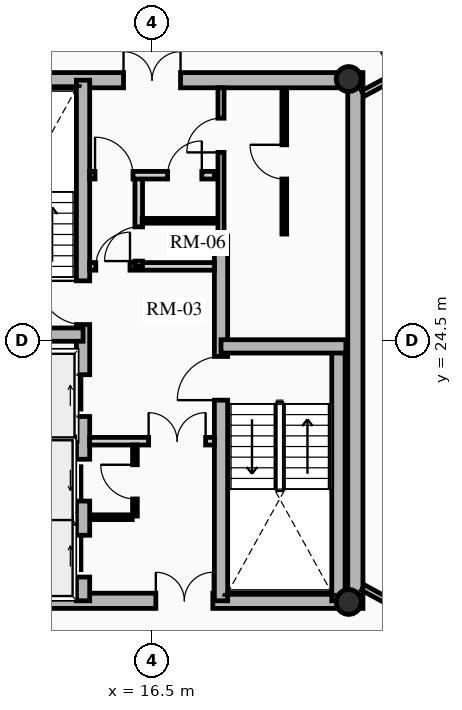
"""IFC4 building model, lengths in metres.
Left out: names, types, materials, properties, quantities, classifications, styles, units other than length and angle.
Written with IfcOpenShell. Run it as: python <this file> out.ifc"""

import sys

from ifc_helpers import new_model, si_unit, direction, frame, frame_2d, origin, origin_2d, place, context, subcontext, project, spatial, rectangle, hollow_circle, extrude, source, transform, mapped, element, fill, save


model = new_model("IFC4")
c1 = context("Model", 3, precision=1e-05, world=origin(), true_north=direction((0.0, 1.0)))
c2 = subcontext(c1, "Body", "Model", "MODEL_VIEW")
j1 = project(units=[si_unit("LENGTHUNIT", "METRE"), si_unit("PLANEANGLEUNIT", "RADIAN")], contexts=[c1])
p1 = place(None, origin())
s1 = spatial("IfcSite", under=j1, at=p1, CompositionType="ELEMENT")
p2 = place(p1, origin())
s2 = spatial("IfcBuilding", under=s1, at=p2, CompositionType="ELEMENT")
p3 = place(p2, frame((0.0, 0.0, 229.25)))
s3 = spatial("IfcBuildingStorey", under=s2, at=p3, CompositionType="ELEMENT", Elevation=229.25)
p4 = place(p3, frame((21.85, 17.45, 0.0), z_axis=(0.0, 0.0, 1.0), x_axis=(0.0, 1.0, 0.0)))
e1 = element("IfcWall", 1, at=p4, inside=s3, PredefinedType="SHEAR", context=c2, shape_type="SweptSolid", body=[
    extrude(rectangle(XDim=14.1, YDim=0.4, at=frame_2d((7.05, 0.0))), origin(), (0.0, 0.0, 1.0), 3.2),
])
p5 = place(p3, frame((11.15, 17.65, 0.0), z_axis=(0.0, 0.0, 1.0), x_axis=(1.0, 0.0, 0.0)))
e2 = element("IfcWall", 2, at=p5, inside=s3, PredefinedType="SHEAR", context=c2, shape_type="SweptSolid", body=[
    extrude(rectangle(XDim=10.7, YDim=0.4, at=frame_2d((5.35, 0.0))), origin(), (0.0, 0.0, 1.0), 3.2),
])
m1 = source(origin(), c2, "Body", "SweptSolid", [
    extrude(rectangle(XDim=1.5, YDim=2.02, at=frame_2d((0.75, 1.01))), frame((0.0, 0.21, 0.0), z_axis=(0.0, -1.0, 0.0), x_axis=(1.0, 0.0, 0.0)), (0.0, 0.0, 1.0), 0.42),
])
p6 = place(p5, frame((5.45, 0.0, 0.0)))
e3 = element("IfcOpeningElement", 3, at=p6, cuts=e2, PredefinedType="OPENING", context=c2, shape_type="MappedRepresentation", body=[
    mapped(m1, transform((0.0, 0.0, 0.0), x_axis=(1.0, 0.0, 0.0), y_axis=(0.0, 1.0, 0.0), z_axis=(0.0, 0.0, 1.0), scale=1.0)),
])
p7 = place(p3, frame((11.15, 31.35, 0.0), z_axis=(0.0, 0.0, 1.0), x_axis=(1.0, 0.0, 0.0)))
e4 = element("IfcWall", 4, at=p7, inside=s3, PredefinedType="SHEAR", context=c2, shape_type="SweptSolid", body=[
    extrude(rectangle(XDim=10.7, YDim=0.4, at=frame_2d((5.35, 0.0))), origin(), (0.0, 0.0, 1.0), 3.2),
])
p8 = place(p7, frame((4.6, 0.0, 0.0)))
e5 = element("IfcOpeningElement", 5, at=p8, cuts=e4, PredefinedType="OPENING", context=c2, shape_type="MappedRepresentation", body=[
    mapped(m1, transform((0.0, 0.0, 0.0), x_axis=(1.0, 0.0, 0.0), y_axis=(0.0, 1.0, 0.0), z_axis=(0.0, 0.0, 1.0), scale=1.0)),
])
p9 = place(p3, frame((14.685, 17.65, 0.0), z_axis=(0.0, 0.0, 1.0), x_axis=(0.0, 1.0, 0.0)))
e6 = element("IfcWall", 6, at=p9, inside=s3, PredefinedType="SHEAR", context=c2, shape_type="SweptSolid", body=[
    extrude(rectangle(XDim=13.7, YDim=0.35, at=frame_2d((6.85, 0.0))), origin(), (0.0, 0.0, 1.0), 3.2),
])
m2 = source(origin(), c2, "Body", "SweptSolid", [
    extrude(rectangle(XDim=1.1, YDim=2.015, at=frame_2d((0.55, 1.007))), frame((0.0, 0.185, 0.0), z_axis=(0.0, -1.0, 0.0), x_axis=(1.0, 0.0, 0.0)), (0.0, 0.0, 1.0), 0.37),
])
p10 = place(p9, frame((4.85, 0.0, 0.0)))
e7 = element("IfcOpeningElement", 7, at=p10, cuts=e6, PredefinedType="OPENING", context=c2, shape_type="MappedRepresentation", body=[
    mapped(m2, transform((0.0, 0.0, 0.0), x_axis=(1.0, 0.0, 0.0), y_axis=(0.0, 1.0, 0.0), z_axis=(0.0, 0.0, 1.0), scale=1.0)),
])
p11 = place(p9, frame((0.625, 0.0, 0.0)))
e8 = element("IfcOpeningElement", 8, at=p11, cuts=e6, PredefinedType="OPENING", context=c2, shape_type="MappedRepresentation", body=[
    mapped(m2, transform((0.0, 0.0, 0.0), x_axis=(1.0, 0.0, 0.0), y_axis=(0.0, 1.0, 0.0), z_axis=(0.0, 0.0, 1.0), scale=1.0)),
])
p12 = place(p9, frame((2.625, 0.0, 0.0)))
e9 = element("IfcOpeningElement", 9, at=p12, cuts=e6, PredefinedType="OPENING", context=c2, shape_type="MappedRepresentation", body=[
    mapped(m2, transform((0.0, 0.0, 0.0), x_axis=(1.0, 0.0, 0.0), y_axis=(0.0, 1.0, 0.0), z_axis=(0.0, 0.0, 1.0), scale=1.0)),
])
m3 = source(origin(), c2, "Body", "SweptSolid", [
    extrude(rectangle(XDim=1.15, YDim=2.02, at=frame_2d((0.575, 1.01))), frame((0.0, 0.185, 0.0), z_axis=(0.0, -1.0, 0.0), x_axis=(1.0, 0.0, 0.0)), (0.0, 0.0, 1.0), 0.37),
])
p13 = place(p9, frame((7.27, 0.0, 0.0)))
e10 = element("IfcOpeningElement", 10, at=p13, cuts=e6, PredefinedType="OPENING", context=c2, shape_type="MappedRepresentation", body=[
    mapped(m3, transform((0.0, 0.0, 0.0), x_axis=(1.0, 0.0, 0.0), y_axis=(0.0, 1.0, 0.0), z_axis=(0.0, 0.0, 1.0), scale=1.0)),
])
p14 = place(p3, frame((18.315, 17.65, 0.0), z_axis=(0.0, 0.0, 1.0), x_axis=(0.0, 1.0, 0.0)))
e11 = element("IfcWall", 11, at=p14, inside=s3, PredefinedType="SHEAR", context=c2, shape_type="SweptSolid", body=[
    extrude(rectangle(XDim=9.6, YDim=0.35, at=frame_2d((4.8, 0.0))), origin(), (0.0, 0.0, 1.0), 3.2),
])
p15 = place(p14, frame((5.28, 0.0, 0.0)))
e12 = element("IfcOpeningElement", 12, at=p15, cuts=e11, PredefinedType="OPENING", context=c2, shape_type="MappedRepresentation", body=[
    mapped(m3, transform((0.0, 0.0, 0.0), x_axis=(1.0, 0.0, 0.0), y_axis=(0.0, 1.0, 0.0), z_axis=(0.0, 0.0, 1.0), scale=1.0)),
])
p16 = place(p3, frame((11.4, 24.655, 0.0), z_axis=(0.0, 0.0, 1.0), x_axis=(1.0, 0.0, 0.0)))
e13 = element("IfcWall", 13, at=p16, inside=s3, PredefinedType="SHEAR", context=c2, shape_type="SweptSolid", body=[
    extrude(rectangle(XDim=3.285, YDim=0.35, at=frame_2d((1.643, 0.0))), origin(), (0.0, 0.0, 1.0), 3.2),
])
p17 = place(p3, frame((21.405, 17.65, 0.0), z_axis=(0.0, 0.0, 1.0), x_axis=(0.0, 1.0, 0.0)))
e14 = element("IfcWall", 14, at=p17, inside=s3, PredefinedType="SHEAR", context=c2, shape_type="SweptSolid", body=[
    extrude(rectangle(XDim=6.695, YDim=0.35, at=frame_2d((3.348, 0.0))), origin(), (0.0, 0.0, 1.0), 3.2),
])
p18 = place(p3, frame((18.315, 24.345, 0.0), z_axis=(0.0, 0.0, 1.0), x_axis=(1.0, 0.0, 0.0)))
e15 = element("IfcWall", 15, at=p18, inside=s3, PredefinedType="SHEAR", context=c2, shape_type="SweptSolid", body=[
    extrude(rectangle(XDim=3.285, YDim=0.35, at=frame_2d((1.643, 0.0))), origin(), (0.0, 0.0, 1.0), 3.2),
])
for number, where, z_axis, x_axis in (
    (16, (21.675, 17.62, 0.0), (0.0, 0.0, 1.0), (1.0, 0.0, 0.0)),
    (17, (21.675, 31.38, 0.0), (0.0, 0.0, 1.0), (1.0, 0.0, 0.0)),
):
    element("IfcColumn", number, at=place(p3, frame(where, z_axis=z_axis, x_axis=x_axis)), inside=s3, PredefinedType="COLUMN", context=c2, shape_type="SweptSolid", body=[
        extrude(hollow_circle(Radius=0.33, WallThickness=0.025, at=origin_2d()), origin(), (0.0, 0.0, 1.0), 3.2),
    ])
for number, where, z_axis, x_axis in (
    (18, (11.52, 21.8, 0.0), (0.0, 0.0, 1.0), (1.0, 0.0, 0.0)),
    (19, (11.52, 19.825, 0.0), (0.0, 0.0, 1.0), (1.0, 0.0, 0.0)),
):
    element("IfcWall", number, at=place(p3, frame(where, z_axis=z_axis, x_axis=x_axis)), inside=s3, PredefinedType="SHEAR", context=c2, shape_type="SweptSolid", body=[
        extrude(rectangle(XDim=2.97, YDim=0.2, at=frame_2d((1.485, 0.0))), origin(), (0.0, 0.0, 1.0), 3.2),
    ])
p19 = place(p3, frame((14.86, 21.85, 0.0), z_axis=(0.0, 0.0, 1.0), x_axis=(1.0, 0.0, 0.0)))
e20 = element("IfcWall", 20, at=p19, inside=s3, PredefinedType="PARTITIONING", context=c2, shape_type="SweptSolid", body=[
    extrude(rectangle(XDim=3.28, YDim=0.2, at=frame_2d((1.64, 0.0))), origin(), (0.0, 0.0, 1.0), 2.975),
])
m4 = source(origin(), c2, "Body", "SweptSolid", [
    extrude(rectangle(XDim=1.5, YDim=2.02, at=frame_2d((0.75, 1.01))), frame((0.0, 0.11, 0.0), z_axis=(0.0, -1.0, 0.0), x_axis=(1.0, 0.0, 0.0)), (0.0, 0.0, 1.0), 0.22),
])
p20 = place(p19, frame((1.55, 0.0, 0.0)))
e21 = element("IfcOpeningElement", 21, at=p20, cuts=e20, PredefinedType="OPENING", context=c2, shape_type="MappedRepresentation", body=[
    mapped(m4, transform((0.0, 0.0, 0.0), x_axis=(1.0, 0.0, 0.0), y_axis=(0.0, 1.0, 0.0), z_axis=(0.0, 0.0, 1.0), scale=1.0)),
])
p21 = place(p3, frame((14.86, 26.45, 0.0), z_axis=(0.0, 0.0, 1.0), x_axis=(1.0, 0.0, 0.0)))
e22 = element("IfcWall", 22, at=p21, inside=s3, PredefinedType="PARTITIONING", context=c2, shape_type="SweptSolid", body=[
    extrude(rectangle(XDim=3.28, YDim=0.2, at=frame_2d((1.64, 0.0))), origin(), (0.0, 0.0, 1.0), 2.975),
])
m5 = source(origin(), c2, "Body", "SweptSolid", [
    extrude(rectangle(XDim=0.9, YDim=2.005, at=frame_2d((0.45, 1.002))), frame((0.0, 0.11, 0.0), z_axis=(0.0, -1.0, 0.0), x_axis=(1.0, 0.0, 0.0)), (0.0, 0.0, 1.0), 0.22),
])
p22 = place(p21, frame((0.16, 0.0, 0.0)))
e23 = element("IfcOpeningElement", 23, at=p22, cuts=e22, PredefinedType="OPENING", context=c2, shape_type="MappedRepresentation", body=[
    mapped(m5, transform((0.0, 0.0, 0.0), x_axis=(1.0, 0.0, 0.0), y_axis=(0.0, 1.0, 0.0), z_axis=(0.0, 0.0, 1.0), scale=1.0)),
])
p23 = place(p3, frame((16.15, 26.45, 0.0), z_axis=(0.0, 0.0, 1.0), x_axis=(0.0, 1.0, 0.0)))
e24 = element("IfcWall", 24, at=p23, inside=s3, PredefinedType="PARTITIONING", context=c2, shape_type="SweptSolid", body=[
    extrude(rectangle(XDim=2.4, YDim=0.2, at=frame_2d((1.2, 0.0))), origin(), (0.0, 0.0, 1.0), 2.975),
])
p24 = place(p23, frame((0.14, 0.0, 0.0)))
e25 = element("IfcOpeningElement", 25, at=p24, cuts=e24, PredefinedType="OPENING", context=c2, shape_type="MappedRepresentation", body=[
    mapped(m5, transform((0.0, 0.0, 0.0), x_axis=(1.0, 0.0, 0.0), y_axis=(0.0, 1.0, 0.0), z_axis=(0.0, 0.0, 1.0), scale=1.0)),
])
p25 = place(p3, frame((14.86, 28.85, 0.0), z_axis=(0.0, 0.0, 1.0), x_axis=(1.0, 0.0, 0.0)))
e26 = element("IfcWall", 26, at=p25, inside=s3, PredefinedType="PARTITIONING", context=c2, shape_type="SweptSolid", body=[
    extrude(rectangle(XDim=3.28, YDim=0.2, at=frame_2d((1.64, 0.0))), origin(), (0.0, 0.0, 1.0), 2.975),
])
m6 = source(origin(), c2, "Body", "SweptSolid", [
    extrude(rectangle(XDim=1.0, YDim=2.015, at=frame_2d((0.5, 1.007))), frame((0.0, 0.11, 0.0), z_axis=(0.0, -1.0, 0.0), x_axis=(1.0, 0.0, 0.0)), (0.0, 0.0, 1.0), 0.22),
])
p26 = place(p25, frame((0.14, 0.0, 0.0)))
e27 = element("IfcOpeningElement", 27, at=p26, cuts=e26, PredefinedType="OPENING", context=c2, shape_type="MappedRepresentation", body=[
    mapped(m6, transform((0.0, 0.0, 0.0), x_axis=(1.0, 0.0, 0.0), y_axis=(0.0, 1.0, 0.0), z_axis=(0.0, 0.0, 1.0), scale=1.0)),
])
p27 = place(p25, frame((2.05, 0.0, 0.0)))
e28 = element("IfcOpeningElement", 28, at=p27, cuts=e26, PredefinedType="OPENING", context=c2, shape_type="MappedRepresentation", body=[
    mapped(m5, transform((0.0, 0.0, 0.0), x_axis=(1.0, 0.0, 0.0), y_axis=(0.0, 1.0, 0.0), z_axis=(0.0, 0.0, 1.0), scale=1.0)),
])
p28 = place(p3, frame((16.05, 19.88, 0.0), z_axis=(0.0, 0.0, 1.0), x_axis=(0.0, 1.0, 0.0)))
e29 = element("IfcWall", 29, at=p28, inside=s3, PredefinedType="PARTITIONING", context=c2, shape_type="SweptSolid", body=[
    extrude(rectangle(XDim=1.87, YDim=0.125, at=frame_2d((0.935, 0.0))), origin(), (0.0, 0.0, 1.0), 2.975),
])
m7 = source(origin(), c2, "Body", "SweptSolid", [
    extrude(rectangle(XDim=0.9, YDim=2.005, at=frame_2d((0.45, 1.002))), frame((0.0, 0.073, 0.0), z_axis=(0.0, -1.0, 0.0), x_axis=(1.0, 0.0, 0.0)), (0.0, 0.0, 1.0), 0.145),
])
p29 = place(p28, frame((0.45, 0.0, 0.0)))
e30 = element("IfcOpeningElement", 30, at=p29, cuts=e29, PredefinedType="OPENING", context=c2, shape_type="MappedRepresentation", body=[
    mapped(m7, transform((0.0, 0.0, 0.0), x_axis=(1.0, 0.0, 0.0), y_axis=(0.0, 1.0, 0.0), z_axis=(0.0, 0.0, 1.0), scale=1.0)),
])
p30 = place(p3, frame((14.88, 19.85, 0.0), z_axis=(0.0, 0.0, 1.0), x_axis=(1.0, 0.0, 0.0)))
e31 = element("IfcWall", 31, at=p30, inside=s3, PredefinedType="PARTITIONING", context=c2, shape_type="SweptSolid", body=[
    extrude(rectangle(XDim=1.1, YDim=0.125, at=frame_2d((0.55, 0.0))), origin(), (0.0, 0.0, 1.0), 2.975),
])
p31 = place(p3, frame((16.24, 27.65, 0.0), z_axis=(0.0, 0.0, 1.0), x_axis=(1.0, 0.0, 0.0)))
e32 = element("IfcWall", 32, at=p31, inside=s3, PredefinedType="PARTITIONING", context=c2, shape_type="SweptSolid", body=[
    extrude(rectangle(XDim=1.88, YDim=0.125, at=frame_2d((0.94, 0.0))), origin(), (0.0, 0.0, 1.0), 2.975),
])
p32 = place(p3, frame((18.315, 27.25, 0.0), z_axis=(0.0, 0.0, 1.0), x_axis=(0.0, 1.0, 0.0)))
e33 = element("IfcWall", 33, at=p32, inside=s3, PredefinedType="PARTITIONING", context=c2, shape_type="SweptSolid", body=[
    extrude(rectangle(XDim=3.9, YDim=0.16, at=frame_2d((1.95, 0.0))), origin(), (0.0, 0.0, 1.0), 2.975),
])
m8 = source(origin(), c2, "Body", "SweptSolid", [
    extrude(rectangle(XDim=0.9, YDim=2.005, at=frame_2d((0.45, 1.002))), frame((0.0, 0.09, 0.0), z_axis=(0.0, -1.0, 0.0), x_axis=(1.0, 0.0, 0.0)), (0.0, 0.0, 1.0), 0.18),
])
p33 = place(p32, frame((2.2, 0.0, 0.0)))
e34 = element("IfcOpeningElement", 34, at=p33, cuts=e33, PredefinedType="OPENING", context=c2, shape_type="MappedRepresentation", body=[
    mapped(m8, transform((0.0, 0.0, 0.0), x_axis=(1.0, 0.0, 0.0), y_axis=(0.0, 1.0, 0.0), z_axis=(0.0, 0.0, 1.0), scale=1.0)),
])
p34 = place(p3, frame((19.98, 27.3, 0.0), z_axis=(0.0, 0.0, 1.0), x_axis=(0.0, 1.0, 0.0)))
e35 = element("IfcWall", 35, at=p34, inside=s3, PredefinedType="PARTITIONING", context=c2, shape_type="SweptSolid", body=[
    extrude(rectangle(XDim=3.82, YDim=0.125, at=frame_2d((1.91, 0.0))), origin(), (0.0, 0.0, 1.0), 2.975),
])
p35 = place(p34, frame((1.45, 0.0, 0.0)))
e36 = element("IfcOpeningElement", 36, at=p35, cuts=e35, PredefinedType="OPENING", context=c2, shape_type="MappedRepresentation", body=[
    mapped(m7, transform((0.0, 0.0, 0.0), x_axis=(1.0, 0.0, 0.0), y_axis=(0.0, 1.0, 0.0), z_axis=(0.0, 0.0, 1.0), scale=1.0)),
])
p36 = place(p3, frame((22.05, 31.0, 0.0), z_axis=(0.0, 0.0, 1.0), x_axis=(0.882791584709, 0.469764853908, 0.0)))
e37 = element("IfcWall", 37, at=p36, inside=s3, PredefinedType="PARTITIONING", context=c2, shape_type="SweptSolid", body=[
    extrude(rectangle(XDim=2.186, YDim=0.16, at=frame_2d((1.093, 0.0))), origin(), (0.0, 0.0, 1.0), 2.545),
])
m9 = source(origin(), c2, "Body", "SweptSolid", [
    extrude(rectangle(XDim=1.05, YDim=2.015, at=frame_2d((0.525, 1.007))), frame((0.0, 0.09, 0.0), z_axis=(0.0, -1.0, 0.0), x_axis=(1.0, 0.0, 0.0)), (0.0, 0.0, 1.0), 0.18),
])
p37 = place(p36, frame((0.936, 0.0, 0.0)))
e38 = element("IfcOpeningElement", 38, at=p37, cuts=e37, PredefinedType="OPENING", context=c2, shape_type="MappedRepresentation", body=[
    mapped(m9, transform((0.0, 0.0, 0.0), x_axis=(1.0, 0.0, 0.0), y_axis=(0.0, 1.0, 0.0), z_axis=(0.0, 0.0, 1.0), scale=1.0)),
])
p38 = place(p3, frame((22.05, 18.0, 0.0), z_axis=(0.0, 0.0, 1.0), x_axis=(0.877252891813, -0.480028503118, 0.0)))
e39 = element("IfcWall", 39, at=p38, inside=s3, PredefinedType="PARTITIONING", context=c2, shape_type="SweptSolid", body=[
    extrude(rectangle(XDim=2.282, YDim=0.16, at=frame_2d((1.141, 0.0))), origin(), (0.0, 0.0, 1.0), 2.545),
])
p39 = place(p38, frame((1.032, 0.0, 0.0)))
e40 = element("IfcOpeningElement", 40, at=p39, cuts=e39, PredefinedType="OPENING", context=c2, shape_type="MappedRepresentation", body=[
    mapped(m9, transform((0.0, 0.0, 0.0), x_axis=(1.0, 0.0, 0.0), y_axis=(0.0, 1.0, 0.0), z_axis=(0.0, 0.0, 1.0), scale=1.0)),
])
m10 = source(origin(), c2, "Body", "SweptSolid", [
    extrude(rectangle(XDim=1.1, YDim=2.015, at=frame_2d((0.55, 1.007))), frame((0.0, 0.025, 0.0), z_axis=(0.0, -1.0, 0.0), x_axis=(1.0, 0.0, 0.0)), (0.0, 0.0, 1.0), 0.05),
])
p40 = place(p10, origin())
e41 = element("IfcDoor", 41, at=p40, inside=s3, OperationType="SLIDING_TO_RIGHT", PredefinedType="DOOR", context=c2, shape_type="MappedRepresentation", body=[
    mapped(m10, transform((0.0, 0.0, 0.0), x_axis=(1.0, 0.0, 0.0), y_axis=(0.0, 1.0, 0.0), z_axis=(0.0, 0.0, 1.0), scale=1.0)),
])
fill(e7, e41)
p41 = place(p11, origin())
e42 = element("IfcDoor", 42, at=p41, inside=s3, OperationType="SLIDING_TO_RIGHT", PredefinedType="DOOR", context=c2, shape_type="MappedRepresentation", body=[
    mapped(m10, transform((0.0, 0.0, 0.0), x_axis=(1.0, 0.0, 0.0), y_axis=(0.0, 1.0, 0.0), z_axis=(0.0, 0.0, 1.0), scale=1.0)),
])
fill(e8, e42)
p42 = place(p12, origin())
e43 = element("IfcDoor", 43, at=p42, inside=s3, OperationType="SLIDING_TO_LEFT", PredefinedType="DOOR", context=c2, shape_type="MappedRepresentation", body=[
    mapped(m10, transform((0.0, 0.0, 0.0), x_axis=(1.0, 0.0, 0.0), y_axis=(0.0, 1.0, 0.0), z_axis=(0.0, 0.0, 1.0), scale=1.0)),
])
fill(e9, e43)
m11 = source(origin(), c2, "Body", "SweptSolid", [
    extrude(rectangle(XDim=1.15, YDim=2.02, at=frame_2d((0.575, 1.01))), frame((0.0, 0.025, 0.0), z_axis=(0.0, -1.0, 0.0), x_axis=(1.0, 0.0, 0.0)), (0.0, 0.0, 1.0), 0.05),
])
p43 = place(p13, origin())
e44 = element("IfcDoor", 44, at=p43, inside=s3, OperationType="SINGLE_SWING_RIGHT", PredefinedType="DOOR", context=c2, shape_type="MappedRepresentation", body=[
    mapped(m11, transform((0.0, 0.0, 0.0), x_axis=(1.0, 0.0, 0.0), y_axis=(0.0, 1.0, 0.0), z_axis=(0.0, 0.0, 1.0), scale=1.0)),
])
fill(e10, e44)
p44 = place(p15, origin())
e45 = element("IfcDoor", 45, at=p44, inside=s3, OperationType="SINGLE_SWING_LEFT", PredefinedType="DOOR", context=c2, shape_type="MappedRepresentation", body=[
    mapped(m11, transform((0.0, 0.0, 0.0), x_axis=(1.0, 0.0, 0.0), y_axis=(0.0, 1.0, 0.0), z_axis=(0.0, 0.0, 1.0), scale=1.0)),
])
fill(e12, e45)
m12 = source(origin(), c2, "Body", "SweptSolid", [
    extrude(rectangle(XDim=1.5, YDim=2.02, at=frame_2d((0.75, 1.01))), frame((0.0, 0.025, 0.0), z_axis=(0.0, -1.0, 0.0), x_axis=(1.0, 0.0, 0.0)), (0.0, 0.0, 1.0), 0.05),
])
p45 = place(p8, origin())
e46 = element("IfcDoor", 46, at=p45, inside=s3, OperationType="DOUBLE_DOOR_SINGLE_SWING", PredefinedType="DOOR", context=c2, shape_type="MappedRepresentation", body=[
    mapped(m12, transform((0.0, 0.0, 0.0), x_axis=(1.0, 0.0, 0.0), y_axis=(0.0, 1.0, 0.0), z_axis=(0.0, 0.0, 1.0), scale=1.0)),
])
fill(e5, e46)
p46 = place(p6, origin())
e47 = element("IfcDoor", 47, at=p46, inside=s3, OperationType="DOUBLE_DOOR_SINGLE_SWING", PredefinedType="DOOR", context=c2, shape_type="MappedRepresentation", body=[
    mapped(m12, transform((0.0, 0.0, 0.0), x_axis=(1.0, 0.0, 0.0), y_axis=(0.0, 1.0, 0.0), z_axis=(0.0, 0.0, 1.0), scale=1.0)),
])
fill(e3, e47)
p47 = place(p20, origin())
e48 = element("IfcDoor", 48, at=p47, inside=s3, OperationType="DOUBLE_DOOR_SINGLE_SWING", PredefinedType="DOOR", context=c2, shape_type="MappedRepresentation", body=[
    mapped(m12, transform((0.0, 0.0, 0.0), x_axis=(1.0, 0.0, 0.0), y_axis=(0.0, 1.0, 0.0), z_axis=(0.0, 0.0, 1.0), scale=1.0)),
])
fill(e21, e48)
m13 = source(origin(), c2, "Body", "SweptSolid", [
    extrude(rectangle(XDim=0.9, YDim=2.005, at=frame_2d((0.45, 1.002))), frame((0.0, 0.025, 0.0), z_axis=(0.0, -1.0, 0.0), x_axis=(1.0, 0.0, 0.0)), (0.0, 0.0, 1.0), 0.05),
])
p48 = place(p22, origin())
e49 = element("IfcDoor", 49, at=p48, inside=s3, OperationType="SINGLE_SWING_RIGHT", PredefinedType="DOOR", context=c2, shape_type="MappedRepresentation", body=[
    mapped(m13, transform((0.0, 0.0, 0.0), x_axis=(1.0, 0.0, 0.0), y_axis=(0.0, 1.0, 0.0), z_axis=(0.0, 0.0, 1.0), scale=1.0)),
])
fill(e23, e49)
m14 = source(origin(), c2, "Body", "SweptSolid", [
    extrude(rectangle(XDim=1.0, YDim=2.015, at=frame_2d((0.5, 1.007))), frame((0.0, 0.025, 0.0), z_axis=(0.0, -1.0, 0.0), x_axis=(1.0, 0.0, 0.0)), (0.0, 0.0, 1.0), 0.05),
])
p49 = place(p26, origin())
e50 = element("IfcDoor", 50, at=p49, inside=s3, OperationType="SINGLE_SWING_LEFT", PredefinedType="DOOR", context=c2, shape_type="MappedRepresentation", body=[
    mapped(m14, transform((0.0, 0.0, 0.0), x_axis=(1.0, 0.0, 0.0), y_axis=(0.0, 1.0, 0.0), z_axis=(0.0, 0.0, 1.0), scale=1.0)),
])
fill(e27, e50)
p50 = place(p29, origin())
e51 = element("IfcDoor", 51, at=p50, inside=s3, OperationType="SINGLE_SWING_RIGHT", PredefinedType="DOOR", context=c2, shape_type="MappedRepresentation", body=[
    mapped(m13, transform((0.0, 0.0, 0.0), x_axis=(1.0, 0.0, 0.0), y_axis=(0.0, 1.0, 0.0), z_axis=(0.0, 0.0, 1.0), scale=1.0)),
])
fill(e30, e51)
p51 = place(p24, origin())
e52 = element("IfcDoor", 52, at=p51, inside=s3, OperationType="SINGLE_SWING_LEFT", PredefinedType="DOOR", context=c2, shape_type="MappedRepresentation", body=[
    mapped(m13, transform((0.0, 0.0, 0.0), x_axis=(1.0, 0.0, 0.0), y_axis=(0.0, 1.0, 0.0), z_axis=(0.0, 0.0, 1.0), scale=1.0)),
])
fill(e25, e52)
p52 = place(p27, origin())
e53 = element("IfcDoor", 53, at=p52, inside=s3, OperationType="SINGLE_SWING_RIGHT", PredefinedType="DOOR", context=c2, shape_type="MappedRepresentation", body=[
    mapped(m13, transform((0.0, 0.0, 0.0), x_axis=(1.0, 0.0, 0.0), y_axis=(0.0, 1.0, 0.0), z_axis=(0.0, 0.0, 1.0), scale=1.0)),
])
fill(e28, e53)
p53 = place(p33, origin())
e54 = element("IfcDoor", 54, at=p53, inside=s3, OperationType="SINGLE_SWING_LEFT", PredefinedType="DOOR", context=c2, shape_type="MappedRepresentation", body=[
    mapped(m13, transform((0.0, 0.0, 0.0), x_axis=(1.0, 0.0, 0.0), y_axis=(0.0, 1.0, 0.0), z_axis=(0.0, 0.0, 1.0), scale=1.0)),
])
fill(e34, e54)
p54 = place(p35, origin())
e55 = element("IfcDoor", 55, at=p54, inside=s3, OperationType="SINGLE_SWING_RIGHT", PredefinedType="DOOR", context=c2, shape_type="MappedRepresentation", body=[
    mapped(m13, transform((0.0, 0.0, 0.0), x_axis=(1.0, 0.0, 0.0), y_axis=(0.0, 1.0, 0.0), z_axis=(0.0, 0.0, 1.0), scale=1.0)),
])
fill(e36, e55)
save(model, sys.argv[1])
